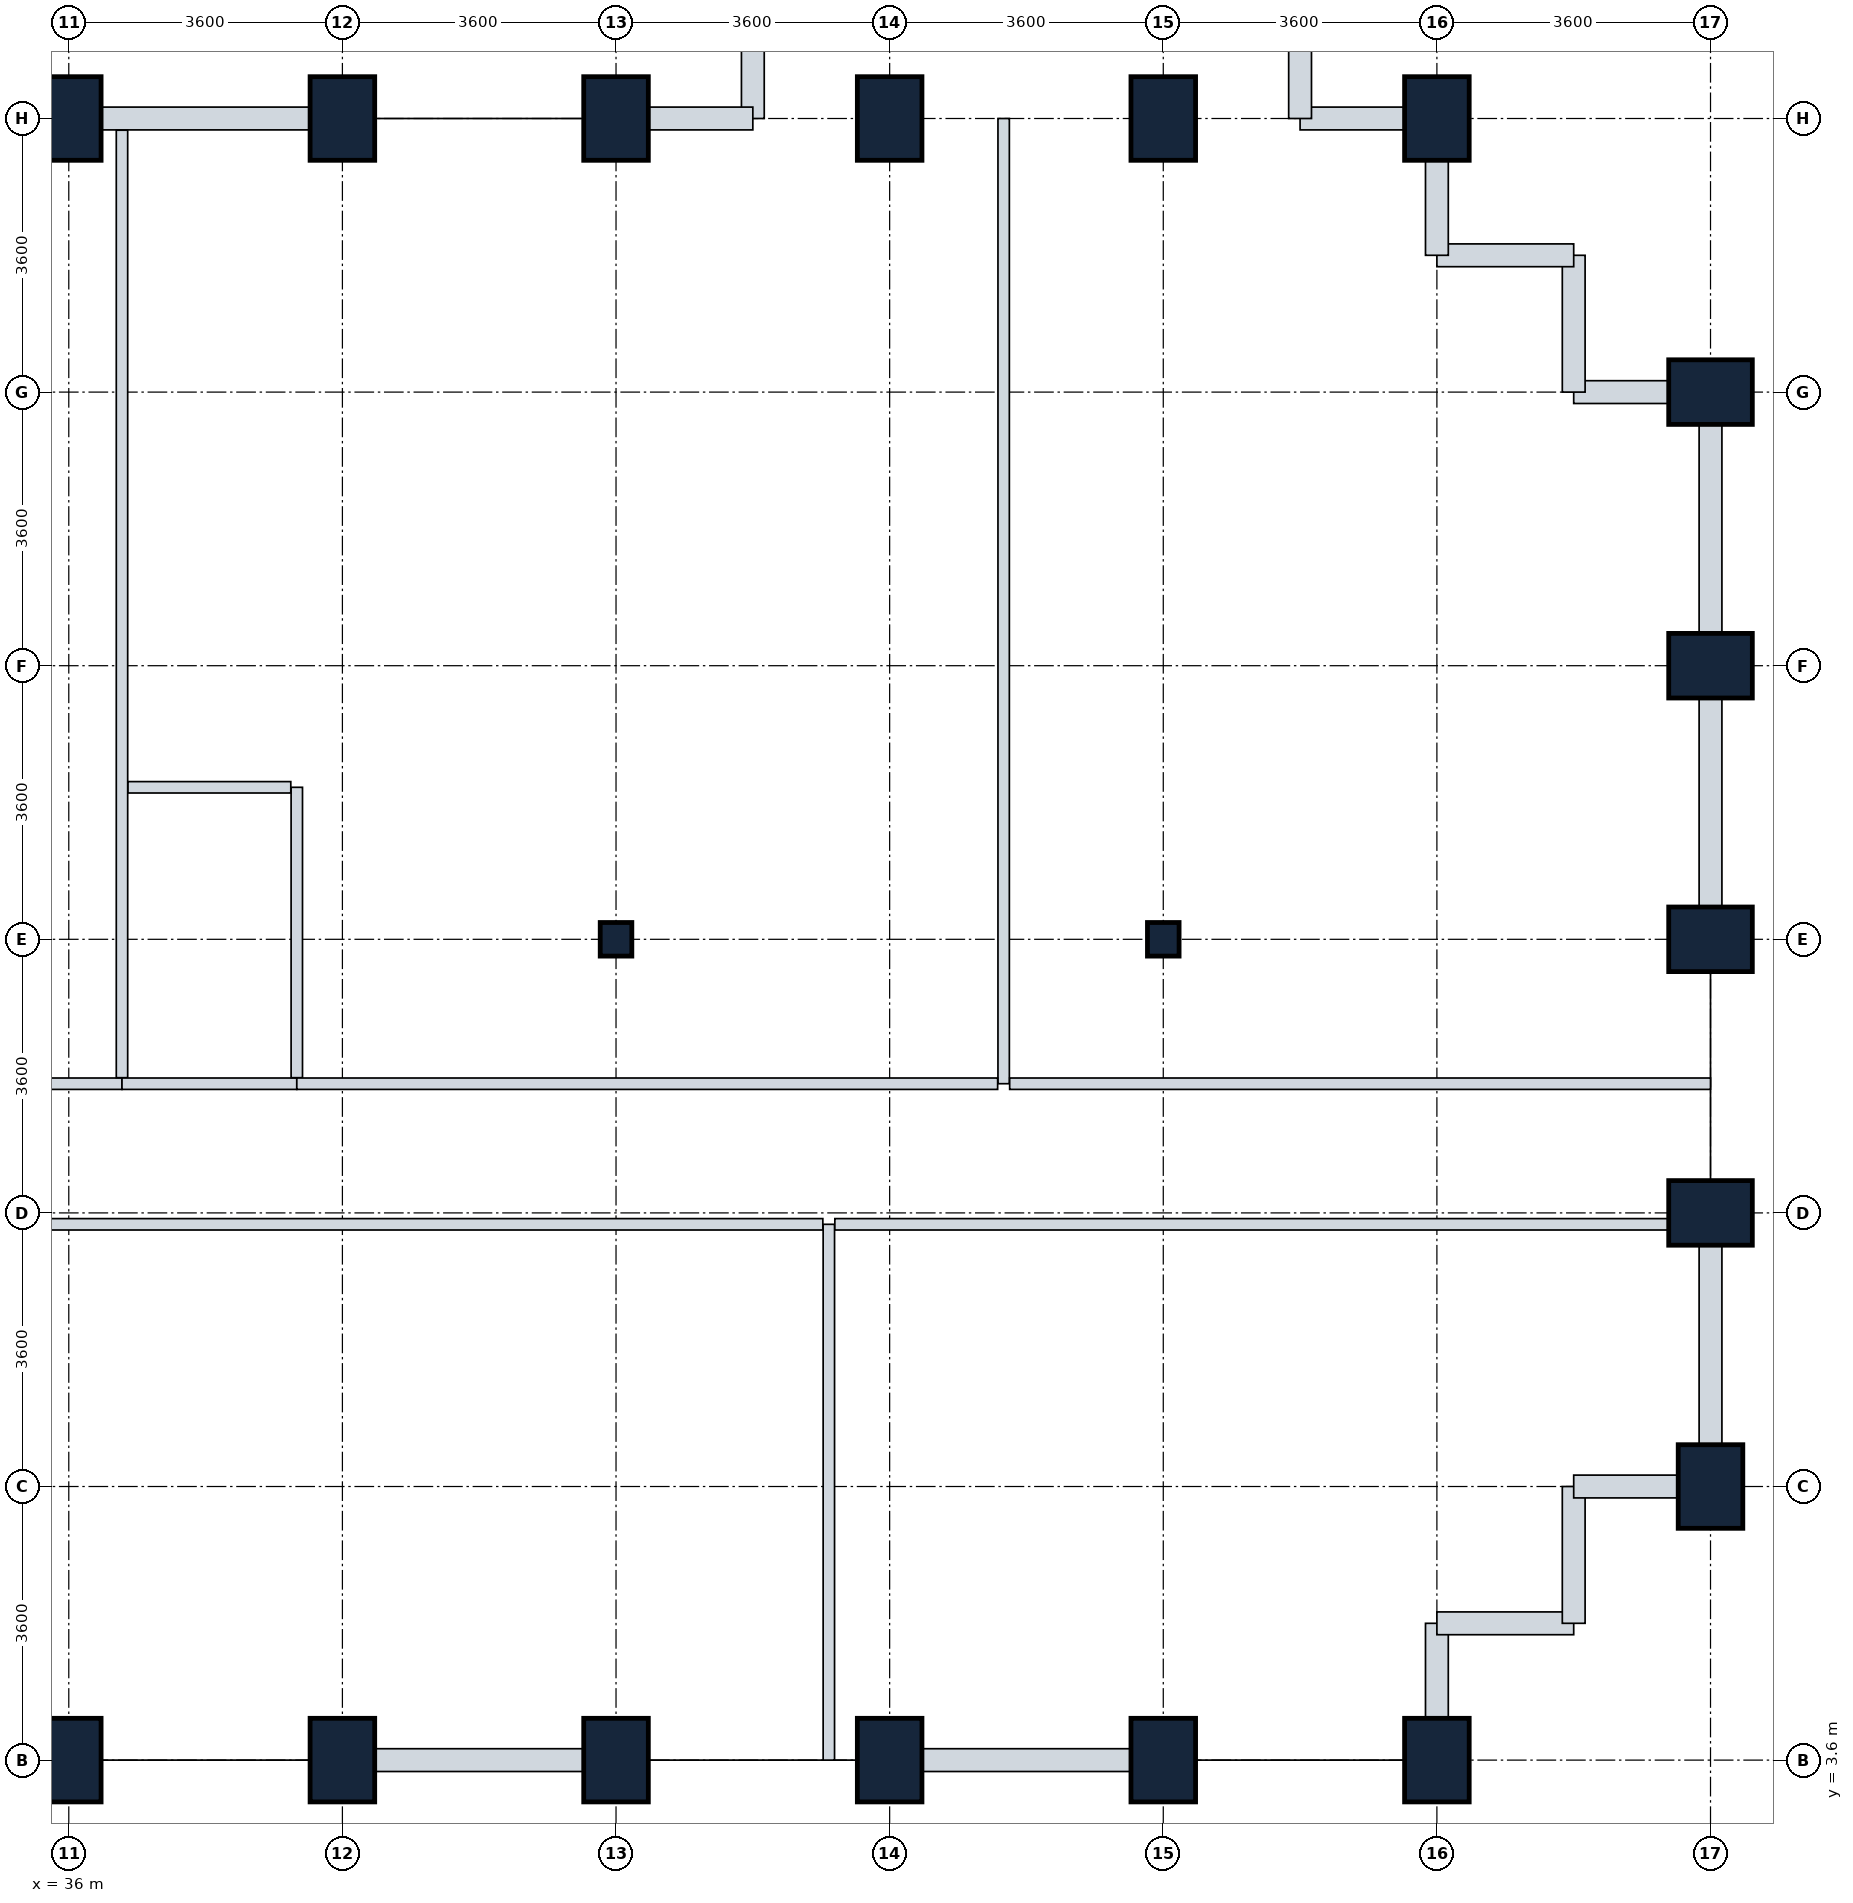
"""IFC4 building model, lengths in metres.
Left out: names, types, materials, properties, quantities, classifications, styles, units other than length and angle.
Written with IfcOpenShell. Run it as: python <this file> out.ifc"""

import sys

from ifc_helpers import new_model, si_unit, direction, frame, frame_2d, origin, origin_2d, place, context, subcontext, project, spatial, rectangle, i_section, extrude, element, fill, save


model = new_model("IFC4")
c1 = context("Model", 3, precision=1e-05, world=origin(), true_north=direction((0.0, 1.0)))
c2 = subcontext(c1, "Body", "Model", "MODEL_VIEW")
j1 = project(units=[si_unit("LENGTHUNIT", "METRE"), si_unit("PLANEANGLEUNIT", "RADIAN")], contexts=[c1])
p1 = place(None, origin())
s1 = spatial("IfcSite", under=j1, at=p1, CompositionType="ELEMENT")
p2 = place(p1, origin())
s2 = spatial("IfcBuilding", under=s1, at=p2, CompositionType="ELEMENT")
p3 = place(p2, frame((0.0, 0.0, 115.2)))
s3 = spatial("IfcBuildingStorey", under=s2, at=p3, CompositionType="ELEMENT", Elevation=115.2)
for number, where, z_axis, x_axis in (
    (1, (36.0, 3.6, 0.0), (0.0, 0.0, 1.0), (1.0, 0.0, 0.0)),
    (2, (36.0, 25.2, 0.0), (0.0, 0.0, 1.0), (1.0, 0.0, 0.0)),
    (3, (39.6, 3.6, 0.0), (0.0, 0.0, 1.0), (1.0, 0.0, 0.0)),
    (4, (39.6, 25.2, 0.0), (0.0, 0.0, 1.0), (1.0, 0.0, 0.0)),
    (5, (43.2, 3.6, 0.0), (0.0, 0.0, 1.0), (1.0, 0.0, 0.0)),
):
    element("IfcColumn", number, at=place(p3, frame(where, z_axis=z_axis, x_axis=x_axis)), inside=s3, PredefinedType="COLUMN", context=c2, shape_type="SweptSolid", body=[
        extrude(rectangle(XDim=0.85, YDim=1.1, at=origin_2d()), origin(), (0.0, 0.0, 1.0), 4.8),
    ])
p4 = place(p3, frame((43.2, 14.4, 0.0), z_axis=(0.0, 0.0, 1.0), x_axis=(1.0, 0.0, 0.0)))
e6 = element("IfcColumn", 6, at=p4, inside=s3, PredefinedType="COLUMN", context=c2, shape_type="SweptSolid", body=[
    extrude(i_section(OverallWidth=0.416, OverallDepth=0.442, WebThickness=0.025, FlangeThickness=0.041, FilletRadius=0.015, at=origin_2d()), origin(), (0.0, 0.0, 1.0), 4.8),
])
for number, where, z_axis, x_axis in (
    (7, (43.2, 25.2, 0.0), (0.0, 0.0, 1.0), (1.0, 0.0, 0.0)),
    (8, (46.8, 3.6, 0.0), (0.0, 0.0, 1.0), (1.0, 0.0, 0.0)),
    (9, (46.8, 25.2, 0.0), (0.0, 0.0, 1.0), (1.0, 0.0, 0.0)),
    (10, (50.4, 3.6, 0.0), (0.0, 0.0, 1.0), (1.0, 0.0, 0.0)),
):
    element("IfcColumn", number, at=place(p3, frame(where, z_axis=z_axis, x_axis=x_axis)), inside=s3, PredefinedType="COLUMN", context=c2, shape_type="SweptSolid", body=[
        extrude(rectangle(XDim=0.85, YDim=1.1, at=origin_2d()), origin(), (0.0, 0.0, 1.0), 4.8),
    ])
p5 = place(p3, frame((50.4, 14.4, 0.0), z_axis=(0.0, 0.0, 1.0), x_axis=(1.0, 0.0, 0.0)))
e11 = element("IfcColumn", 11, at=p5, inside=s3, PredefinedType="COLUMN", context=c2, shape_type="SweptSolid", body=[
    extrude(i_section(OverallWidth=0.416, OverallDepth=0.442, WebThickness=0.025, FlangeThickness=0.041, FilletRadius=0.015, at=origin_2d()), origin(), (0.0, 0.0, 1.0), 4.8),
])
for number, where, z_axis, x_axis in (
    (12, (50.4, 25.2, 0.0), (0.0, 0.0, 1.0), (1.0, 0.0, 0.0)),
    (13, (54.0, 3.6, 0.0), (0.0, 0.0, 1.0), (1.0, 0.0, 0.0)),
    (14, (54.0, 25.2, 0.0), (0.0, 0.0, 1.0), (1.0, 0.0, 0.0)),
    (15, (57.6, 7.2, 0.0), (0.0, 0.0, 1.0), (1.0, 0.0, 0.0)),
    (16, (57.6, 10.8, 0.0), (0.0, 0.0, 1.0), (0.0, 1.0, 0.0)),
    (17, (57.6, 14.4, 0.0), (0.0, 0.0, 1.0), (0.0, 1.0, 0.0)),
    (18, (57.6, 18.0, 0.0), (0.0, 0.0, 1.0), (0.0, 1.0, 0.0)),
    (19, (57.6, 21.6, 0.0), (0.0, 0.0, 1.0), (0.0, 1.0, 0.0)),
):
    element("IfcColumn", number, at=place(p3, frame(where, z_axis=z_axis, x_axis=x_axis)), inside=s3, PredefinedType="COLUMN", context=c2, shape_type="SweptSolid", body=[
        extrude(rectangle(XDim=0.85, YDim=1.1, at=origin_2d()), origin(), (0.0, 0.0, 1.0), 4.8),
    ])
p6 = place(p3, frame((36.0, 3.6, 0.0), z_axis=(0.0, 0.0, 1.0), x_axis=(-1.0, 0.0, 0.0)))
e20 = element("IfcWall", 20, at=p6, inside=s3, PredefinedType="STANDARD", context=c2, shape_type="SweptSolid", body=[
    extrude(rectangle(XDim=3.6, YDim=0.3, at=frame_2d((1.8, 0.0))), origin(), (0.0, 0.0, 1.0), 3.93),
])
for number, where, z_axis, x_axis in (
    (21, (43.2, 3.6, 0.0), (0.0, 0.0, 1.0), (-1.0, 0.0, 0.0)),
    (22, (50.4, 3.6, 0.0), (0.0, 0.0, 1.0), (-1.0, 0.0, 0.0)),
):
    element("IfcWall", number, at=place(p3, frame(where, z_axis=z_axis, x_axis=x_axis)), inside=s3, PredefinedType="STANDARD", context=c2, shape_type="SweptSolid", body=[
        extrude(rectangle(XDim=3.6, YDim=0.3, at=frame_2d((1.8, 0.0))), origin(), (0.0, 0.0, 1.0), 3.93),
    ])
p7 = place(p3, frame((54.0, 5.4, 0.0), z_axis=(0.0, 0.0, 1.0), x_axis=(0.0, -1.0, 0.0)))
e23 = element("IfcWall", 23, at=p7, inside=s3, PredefinedType="STANDARD", context=c2, shape_type="SweptSolid", body=[
    extrude(rectangle(XDim=1.8, YDim=0.3, at=frame_2d((0.9, 0.0))), origin(), (0.0, 0.0, 1.0), 3.93),
])
for number, where, z_axis, x_axis in (
    (24, (55.8, 5.4, 0.0), (0.0, 0.0, 1.0), (-1.0, 0.0, 0.0)),
    (25, (55.8, 7.2, 0.0), (0.0, 0.0, 1.0), (0.0, -1.0, 0.0)),
):
    element("IfcWall", number, at=place(p3, frame(where, z_axis=z_axis, x_axis=x_axis)), inside=s3, PredefinedType="STANDARD", context=c2, shape_type="SweptSolid", body=[
        extrude(rectangle(XDim=1.8, YDim=0.3, at=frame_2d((0.9, 0.0))), origin(), (0.0, 0.0, 1.0), 4.535),
    ])
p8 = place(p3, frame((57.6, 7.2, 0.0), z_axis=(0.0, 0.0, 1.0), x_axis=(-1.0, 0.0, 0.0)))
e26 = element("IfcWall", 26, at=p8, inside=s3, PredefinedType="STANDARD", context=c2, shape_type="SweptSolid", body=[
    extrude(rectangle(XDim=1.8, YDim=0.3, at=frame_2d((0.9, 0.0))), origin(), (0.0, 0.0, 1.0), 3.93),
])
for number, where, z_axis, x_axis in (
    (27, (57.6, 10.8, 0.0), (0.0, 0.0, 1.0), (0.0, -1.0, 0.0)),
    (28, (57.6, 18.0, 0.0), (0.0, 0.0, 1.0), (0.0, -1.0, 0.0)),
    (29, (57.6, 21.6, 0.0), (0.0, 0.0, 1.0), (0.0, -1.0, 0.0)),
):
    element("IfcWall", number, at=place(p3, frame(where, z_axis=z_axis, x_axis=x_axis)), inside=s3, PredefinedType="STANDARD", context=c2, shape_type="SweptSolid", body=[
        extrude(rectangle(XDim=3.6, YDim=0.3, at=frame_2d((1.8, 0.0))), origin(), (0.0, 0.0, 1.0), 3.93),
    ])
p9 = place(p3, frame((55.8, 21.6, 0.0), z_axis=(0.0, 0.0, 1.0), x_axis=(1.0, 0.0, 0.0)))
e30 = element("IfcWall", 30, at=p9, inside=s3, PredefinedType="STANDARD", context=c2, shape_type="SweptSolid", body=[
    extrude(rectangle(XDim=1.8, YDim=0.3, at=frame_2d((0.9, 0.0))), origin(), (0.0, 0.0, 1.0), 3.93),
])
p10 = place(p3, frame((55.8, 23.4, 0.0), z_axis=(0.0, 0.0, 1.0), x_axis=(0.0, -1.0, 0.0)))
e31 = element("IfcWall", 31, at=p10, inside=s3, PredefinedType="STANDARD", context=c2, shape_type="SweptSolid", body=[
    extrude(rectangle(XDim=1.8, YDim=0.3, at=frame_2d((0.9, 0.0))), origin(), (0.0, 0.0, 1.0), 4.535),
])
p11 = place(p3, frame((54.0, 23.4, 0.0), z_axis=(0.0, 0.0, 1.0), x_axis=(1.0, 0.0, 0.0)))
e32 = element("IfcWall", 32, at=p11, inside=s3, PredefinedType="STANDARD", context=c2, shape_type="SweptSolid", body=[
    extrude(rectangle(XDim=1.8, YDim=0.3, at=frame_2d((0.9, 0.0))), origin(), (0.0, 0.0, 1.0), 4.535),
])
for number, where, z_axis, x_axis in (
    (33, (54.0, 25.2, 0.0), (0.0, 0.0, 1.0), (0.0, -1.0, 0.0)),
    (34, (52.2, 25.2, 0.0), (0.0, 0.0, 1.0), (1.0, 0.0, 0.0)),
):
    element("IfcWall", number, at=place(p3, frame(where, z_axis=z_axis, x_axis=x_axis)), inside=s3, PredefinedType="STANDARD", context=c2, shape_type="SweptSolid", body=[
        extrude(rectangle(XDim=1.8, YDim=0.3, at=frame_2d((0.9, 0.0))), origin(), (0.0, 0.0, 1.0), 3.93),
    ])
for number, where, z_axis, x_axis in (
    (35, (52.2, 27.3, 0.0), (0.0, 0.0, 1.0), (0.0, -1.0, 0.0)),
    (36, (45.0, 27.3, 0.0), (0.0, 0.0, 1.0), (0.0, -1.0, 0.0)),
):
    element("IfcWall", number, at=place(p3, frame(where, z_axis=z_axis, x_axis=x_axis)), inside=s3, PredefinedType="STANDARD", context=c2, shape_type="SweptSolid", body=[
        extrude(rectangle(XDim=2.1, YDim=0.3, at=frame_2d((1.05, 0.0))), origin(), (0.0, 0.0, 1.0), 3.93),
    ])
p12 = place(p3, frame((43.2, 25.2, 0.0), z_axis=(0.0, 0.0, 1.0), x_axis=(1.0, 0.0, 0.0)))
e37 = element("IfcWall", 37, at=p12, inside=s3, PredefinedType="STANDARD", context=c2, shape_type="SweptSolid", body=[
    extrude(rectangle(XDim=1.8, YDim=0.3, at=frame_2d((0.9, 0.0))), origin(), (0.0, 0.0, 1.0), 3.93),
])
p13 = place(p3, frame((36.0, 25.2, 0.0), z_axis=(0.0, 0.0, 1.0), x_axis=(1.0, 0.0, 0.0)))
e38 = element("IfcWall", 38, at=p13, inside=s3, PredefinedType="STANDARD", context=c2, shape_type="SweptSolid", body=[
    extrude(rectangle(XDim=3.6, YDim=0.3, at=frame_2d((1.8, 0.0))), origin(), (0.0, 0.0, 1.0), 3.93),
])
p14 = place(p3, frame((34.479, 12.5, 0.0), z_axis=(0.0, 0.0, 1.0), x_axis=(1.0, 0.0, 0.0)))
e39 = element("IfcWall", 39, at=p14, inside=s3, PredefinedType="PARTITIONING", context=c2, shape_type="SweptSolid", body=[
    extrude(rectangle(XDim=2.221, YDim=0.15, at=frame_2d((1.11, 0.0))), origin(), (0.0, 0.0, 1.0), 4.08),
])
p15 = place(p14, frame((0.674, 0.0, 0.0)))
e40 = element("IfcOpeningElement", 40, at=p15, cuts=e39, PredefinedType="OPENING", context=c2, shape_type="SweptSolid", body=[
    extrude(rectangle(XDim=0.85, YDim=2.1, at=frame_2d((0.425, 1.05))), frame((0.0, 0.085, 0.0), z_axis=(0.0, -1.0, 0.0), x_axis=(1.0, 0.0, 0.0)), (0.0, 0.0, 1.0), 0.17),
])
p16 = place(p3, frame((36.7, 12.579, 0.0), z_axis=(0.0, 0.0, 1.0), x_axis=(0.0, 1.0, 0.0)))
e41 = element("IfcWall", 41, at=p16, inside=s3, PredefinedType="PARTITIONING", context=c2, shape_type="SweptSolid", body=[
    extrude(rectangle(XDim=12.467, YDim=0.15, at=frame_2d((6.233, 0.0))), origin(), (0.0, 0.0, 1.0), 3.93),
])
p17 = place(p3, frame((36.7, 12.5, 0.0), z_axis=(0.0, 0.0, 1.0), x_axis=(1.0, 0.0, 0.0)))
e42 = element("IfcWall", 42, at=p17, inside=s3, PredefinedType="PARTITIONING", context=c2, shape_type="SweptSolid", body=[
    extrude(rectangle(XDim=2.3, YDim=0.15, at=frame_2d((1.15, 0.0))), origin(), (0.0, 0.0, 1.0), 4.535),
])
p18 = place(p17, frame((0.697, 0.0, 0.0)))
e43 = element("IfcOpeningElement", 43, at=p18, cuts=e42, PredefinedType="OPENING", context=c2, shape_type="SweptSolid", body=[
    extrude(rectangle(XDim=0.85, YDim=2.1, at=frame_2d((0.425, 1.05))), frame((0.0, 0.085, 0.0), z_axis=(0.0, -1.0, 0.0), x_axis=(1.0, 0.0, 0.0)), (0.0, 0.0, 1.0), 0.17),
])
p19 = place(p3, frame((39.0, 12.579, 0.0), z_axis=(0.0, 0.0, 1.0), x_axis=(0.0, 1.0, 0.0)))
e44 = element("IfcWall", 44, at=p19, inside=s3, PredefinedType="PARTITIONING", context=c2, shape_type="SweptSolid", body=[
    extrude(rectangle(XDim=3.821, YDim=0.15, at=frame_2d((1.91, 0.0))), origin(), (0.0, 0.0, 1.0), 4.08),
])
p20 = place(p3, frame((36.779, 16.4, 0.0), z_axis=(0.0, 0.0, 1.0), x_axis=(1.0, 0.0, 0.0)))
e45 = element("IfcWall", 45, at=p20, inside=s3, PredefinedType="PARTITIONING", context=c2, shape_type="SweptSolid", body=[
    extrude(rectangle(XDim=2.142, YDim=0.15, at=frame_2d((1.071, 0.0))), origin(), (0.0, 0.0, 1.0), 4.535),
])
p21 = place(p3, frame((46.0, 3.6, 0.0), z_axis=(0.0, 0.0, 1.0), x_axis=(0.0, 1.0, 0.0)))
e46 = element("IfcWall", 46, at=p21, inside=s3, PredefinedType="PARTITIONING", context=c2, shape_type="SweptSolid", body=[
    extrude(rectangle(XDim=7.05, YDim=0.15, at=frame_2d((3.525, 0.0))), origin(), (0.0, 0.0, 1.0), 3.93),
])
p22 = place(p3, frame((34.479, 10.65, 0.0), z_axis=(0.0, 0.0, 1.0), x_axis=(1.0, 0.0, 0.0)))
e47 = element("IfcWall", 47, at=p22, inside=s3, PredefinedType="PARTITIONING", context=c2, shape_type="SweptSolid", body=[
    extrude(rectangle(XDim=11.442, YDim=0.15, at=frame_2d((5.721, 0.0))), origin(), (0.0, 0.0, 1.0), 4.08),
])
p23 = place(p22, frame((5.221, 0.0, 0.0)))
e48 = element("IfcOpeningElement", 48, at=p23, cuts=e47, PredefinedType="OPENING", context=c2, shape_type="SweptSolid", body=[
    extrude(rectangle(XDim=1.0, YDim=2.1, at=frame_2d((0.5, 1.05))), frame((0.0, 0.085, 0.0), z_axis=(0.0, -1.0, 0.0), x_axis=(1.0, 0.0, 0.0)), (0.0, 0.0, 1.0), 0.17),
])
p24 = place(p3, frame((46.079, 10.65, 0.0), z_axis=(0.0, 0.0, 1.0), x_axis=(1.0, 0.0, 0.0)))
e49 = element("IfcWall", 49, at=p24, inside=s3, PredefinedType="PARTITIONING", context=c2, shape_type="SweptSolid", body=[
    extrude(rectangle(XDim=11.367, YDim=0.15, at=frame_2d((5.684, 0.0))), origin(), (0.0, 0.0, 1.0), 3.93),
])
p25 = place(p24, frame((5.221, 0.0, 0.0)))
e50 = element("IfcOpeningElement", 50, at=p25, cuts=e49, PredefinedType="OPENING", context=c2, shape_type="SweptSolid", body=[
    extrude(rectangle(XDim=1.0, YDim=2.1, at=frame_2d((0.5, 1.05))), frame((0.0, 0.085, 0.0), z_axis=(0.0, -1.0, 0.0), x_axis=(1.0, 0.0, 0.0)), (0.0, 0.0, 1.0), 0.17),
])
p26 = place(p3, frame((48.3, 12.5, 0.0), z_axis=(0.0, 0.0, 1.0), x_axis=(0.0, 1.0, 0.0)))
e51 = element("IfcWall", 51, at=p26, inside=s3, PredefinedType="PARTITIONING", context=c2, shape_type="SweptSolid", body=[
    extrude(rectangle(XDim=12.7, YDim=0.15, at=frame_2d((6.35, 0.0))), origin(), (0.0, 0.0, 1.0), 3.93),
])
p27 = place(p3, frame((39.0, 12.5, 0.0), z_axis=(0.0, 0.0, 1.0), x_axis=(1.0, 0.0, 0.0)))
e52 = element("IfcWall", 52, at=p27, inside=s3, PredefinedType="PARTITIONING", context=c2, shape_type="SweptSolid", body=[
    extrude(rectangle(XDim=9.221, YDim=0.15, at=frame_2d((4.61, 0.0))), origin(), (0.0, 0.0, 1.0), 4.09),
])
p28 = place(p27, frame((6.743, 0.0, 0.0)))
e53 = element("IfcOpeningElement", 53, at=p28, cuts=e52, PredefinedType="OPENING", context=c2, shape_type="SweptSolid", body=[
    extrude(rectangle(XDim=1.0, YDim=2.1, at=frame_2d((0.5, 1.05))), frame((0.0, 0.085, 0.0), z_axis=(0.0, -1.0, 0.0), x_axis=(1.0, 0.0, 0.0)), (0.0, 0.0, 1.0), 0.17),
])
p29 = place(p3, frame((48.379, 12.5, 0.0), z_axis=(0.0, 0.0, 1.0), x_axis=(1.0, 0.0, 0.0)))
e54 = element("IfcWall", 54, at=p29, inside=s3, PredefinedType="PARTITIONING", context=c2, shape_type="SweptSolid", body=[
    extrude(rectangle(XDim=9.221, YDim=0.15, at=frame_2d((4.611, 0.0))), origin(), (0.0, 0.0, 1.0), 3.93),
])
p30 = place(p29, frame((4.59, 0.0, 0.0)))
e55 = element("IfcOpeningElement", 55, at=p30, cuts=e54, PredefinedType="OPENING", context=c2, shape_type="SweptSolid", body=[
    extrude(rectangle(XDim=1.0, YDim=2.1, at=frame_2d((0.5, 1.05))), frame((0.0, 0.085, 0.0), z_axis=(0.0, -1.0, 0.0), x_axis=(1.0, 0.0, 0.0)), (0.0, 0.0, 1.0), 0.17),
])
p31 = place(p15, origin())
e56 = element("IfcDoor", 56, at=p31, inside=s3, OperationType="SINGLE_SWING_RIGHT", PredefinedType="DOOR", context=c2, shape_type="SweptSolid", body=[
    extrude(rectangle(XDim=0.85, YDim=2.1, at=frame_2d((0.425, 1.05))), frame((0.0, 0.025, 0.0), z_axis=(0.0, -1.0, 0.0), x_axis=(1.0, 0.0, 0.0)), (0.0, 0.0, 1.0), 0.05),
])
fill(e40, e56)
p32 = place(p18, origin())
e57 = element("IfcDoor", 57, at=p32, inside=s3, OperationType="SINGLE_SWING_RIGHT", PredefinedType="DOOR", context=c2, shape_type="SweptSolid", body=[
    extrude(rectangle(XDim=0.85, YDim=2.1, at=frame_2d((0.425, 1.05))), frame((0.0, 0.025, 0.0), z_axis=(0.0, -1.0, 0.0), x_axis=(1.0, 0.0, 0.0)), (0.0, 0.0, 1.0), 0.05),
])
fill(e43, e57)
p33 = place(p23, origin())
e58 = element("IfcDoor", 58, at=p33, inside=s3, OperationType="SINGLE_SWING_RIGHT", PredefinedType="DOOR", context=c2, shape_type="SweptSolid", body=[
    extrude(rectangle(XDim=1.0, YDim=2.1, at=frame_2d((0.5, 1.05))), frame((0.0, 0.025, 0.0), z_axis=(0.0, -1.0, 0.0), x_axis=(1.0, 0.0, 0.0)), (0.0, 0.0, 1.0), 0.05),
])
fill(e48, e58)
p34 = place(p25, origin())
e59 = element("IfcDoor", 59, at=p34, inside=s3, OperationType="SINGLE_SWING_RIGHT", PredefinedType="DOOR", context=c2, shape_type="SweptSolid", body=[
    extrude(rectangle(XDim=1.0, YDim=2.1, at=frame_2d((0.5, 1.05))), frame((0.0, 0.025, 0.0), z_axis=(0.0, -1.0, 0.0), x_axis=(1.0, 0.0, 0.0)), (0.0, 0.0, 1.0), 0.05),
])
fill(e50, e59)
p35 = place(p28, origin())
e60 = element("IfcDoor", 60, at=p35, inside=s3, OperationType="SINGLE_SWING_RIGHT", PredefinedType="DOOR", context=c2, shape_type="SweptSolid", body=[
    extrude(rectangle(XDim=1.0, YDim=2.1, at=frame_2d((0.5, 1.05))), frame((0.0, 0.025, 0.0), z_axis=(0.0, -1.0, 0.0), x_axis=(1.0, 0.0, 0.0)), (0.0, 0.0, 1.0), 0.05),
])
fill(e53, e60)
p36 = place(p30, origin())
e61 = element("IfcDoor", 61, at=p36, inside=s3, OperationType="SINGLE_SWING_RIGHT", PredefinedType="DOOR", context=c2, shape_type="SweptSolid", body=[
    extrude(rectangle(XDim=1.0, YDim=2.1, at=frame_2d((0.5, 1.05))), frame((0.0, 0.025, 0.0), z_axis=(0.0, -1.0, 0.0), x_axis=(1.0, 0.0, 0.0)), (0.0, 0.0, 1.0), 0.05),
])
fill(e55, e61)
save(model, sys.argv[1])
